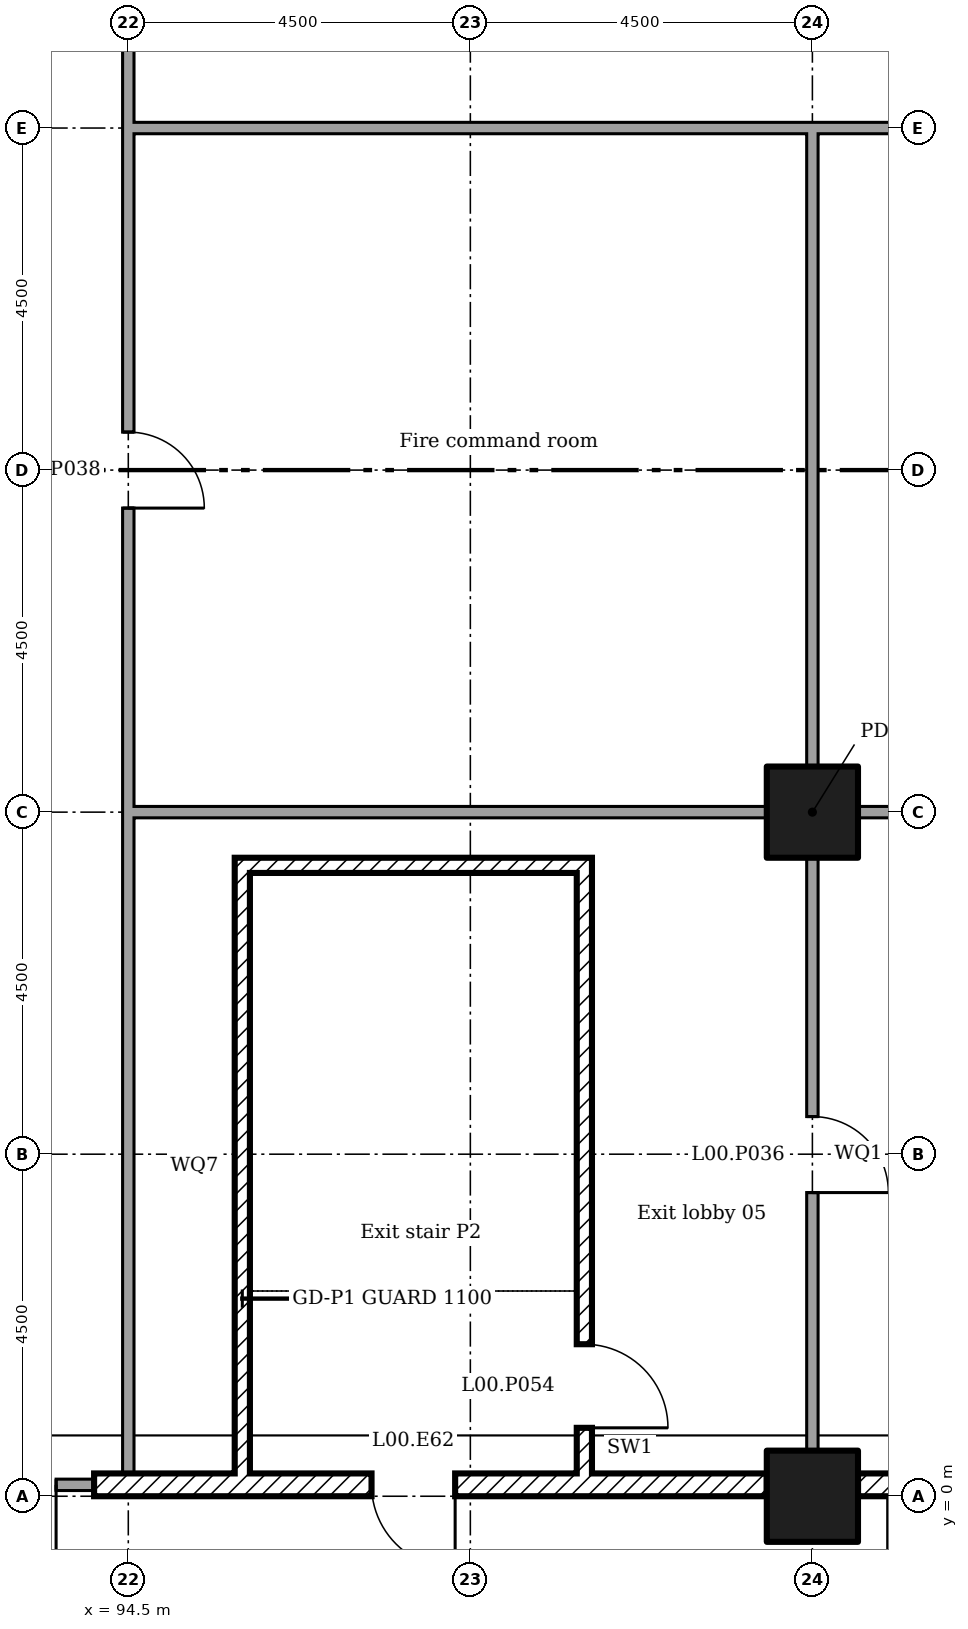
"""IFC4 building model, lengths in metres.
Left out: names, types, materials, properties, quantities, classifications, styles, units other than length and angle.
Written with IfcOpenShell. Run it as: python <this file> out.ifc"""

import sys

from ifc_helpers import new_model, si_unit, direction, frame, frame_2d, origin, origin_2d, place, context, subcontext, project, spatial, rectangle, extrude, element, fill, save


model = new_model("IFC4")
c1 = context("Model", 3, precision=1e-05, world=origin(), true_north=direction((0.0, 1.0)))
c2 = subcontext(c1, "Body", "Model", "MODEL_VIEW")
j1 = project(units=[si_unit("LENGTHUNIT", "METRE"), si_unit("PLANEANGLEUNIT", "RADIAN")], contexts=[c1])
p1 = place(None, origin())
s1 = spatial("IfcSite", under=j1, at=p1, CompositionType="ELEMENT")
p2 = place(p1, origin())
s2 = spatial("IfcBuilding", under=s1, at=p2, CompositionType="ELEMENT")
p3 = place(p2, origin())
s3 = spatial("IfcBuildingStorey", under=s2, at=p3, CompositionType="ELEMENT", Elevation=0.0)
for number, where in (
    (1, (103.5, 0.0, 0.0)),
    (2, (103.5, 9.0, 0.0)),
):
    element("IfcColumn", number, at=place(p3, frame(where)), inside=s3, PredefinedType="COLUMN", context=c2, shape_type="SweptSolid", body=[
        extrude(rectangle(XDim=1.2, YDim=1.2, at=origin_2d()), origin(), (0.0, 0.0, 1.0), 6.0),
    ])
p4 = place(p3, frame((90.6, 0.15, 0.0)))
e3 = element("IfcWall", 3, at=p4, inside=s3, PredefinedType="SOLIDWALL", context=c2, shape_type="SweptSolid", body=[
    extrude(rectangle(XDim=3.45, YDim=0.15, at=frame_2d((1.725, 0.0))), origin(), (0.0, 0.0, 1.0), 5.55),
])
p5 = place(p4, frame((0.55, 0.0, 0.0)))
e4 = element("IfcOpeningElement", 4, at=p5, cuts=e3, PredefinedType="OPENING", context=c2, shape_type="SweptSolid", body=[
    extrude(rectangle(XDim=2.4, YDim=2.7, at=frame_2d((1.2, 1.35))), frame((0.0, 0.085, 0.0), z_axis=(0.0, -1.0, 0.0), x_axis=(1.0, 0.0, 0.0)), (0.0, 0.0, 1.0), 0.17),
])
p6 = place(p3, frame((94.05, 0.15, 0.0)))
e5 = element("IfcWall", 5, at=p6, inside=s3, PredefinedType="ELEMENTEDWALL", context=c2, shape_type="SweptSolid", body=[
    extrude(rectangle(XDim=3.15, YDim=0.3, at=frame_2d((1.575, 0.0))), origin(), (0.0, 0.0, 1.0), 5.55),
])
p7 = place(p3, frame((97.2, 0.15, 0.0)))
e6 = element("IfcWall", 6, at=p7, inside=s3, PredefinedType="ELEMENTEDWALL", context=c2, shape_type="SweptSolid", body=[
    extrude(rectangle(XDim=2.1, YDim=0.3, at=frame_2d((1.05, 0.0))), origin(), (0.0, 0.0, 1.0), 5.55),
])
p8 = place(p7, frame((0.5, 0.0, 0.0)))
e7 = element("IfcOpeningElement", 7, at=p8, cuts=e6, PredefinedType="OPENING", context=c2, shape_type="SweptSolid", body=[
    extrude(rectangle(XDim=1.1, YDim=2.4, at=frame_2d((0.55, 1.2))), frame((0.0, 0.16, 0.0), z_axis=(0.0, -1.0, 0.0), x_axis=(1.0, 0.0, 0.0)), (0.0, 0.0, 1.0), 0.32),
])
p9 = place(p3, frame((99.3, 0.15, 0.0)))
e8 = element("IfcWall", 8, at=p9, inside=s3, PredefinedType="ELEMENTEDWALL", context=c2, shape_type="SweptSolid", body=[
    extrude(rectangle(XDim=3.6, YDim=0.3, at=frame_2d((1.8, 0.0))), origin(), (0.0, 0.0, 1.0), 5.55),
])
p10 = place(p3, frame((104.1, 0.15, 0.0)))
e9 = element("IfcWall", 9, at=p10, inside=s3, PredefinedType="ELEMENTEDWALL", context=c2, shape_type="SweptSolid", body=[
    extrude(rectangle(XDim=4.116, YDim=0.3, at=frame_2d((2.058, 0.0))), origin(), (0.0, 0.0, 1.0), 5.55),
])
p11 = place(p3, frame((94.5, 0.3, 0.0), z_axis=(0.0, 0.0, 1.0), x_axis=(0.0, 1.0, 0.0)))
e10 = element("IfcWall", 10, at=p11, inside=s3, PredefinedType="PARTITIONING", context=c2, shape_type="SweptSolid", body=[
    extrude(rectangle(XDim=8.775, YDim=0.15, at=frame_2d((4.387, 0.0))), origin(), (0.0, 0.0, 1.0), 5.55),
])
p12 = place(p3, frame((94.5, 9.0, 0.0), z_axis=(0.0, 0.0, 1.0), x_axis=(0.0, 1.0, 0.0)))
e11 = element("IfcWall", 11, at=p12, inside=s3, PredefinedType="PARTITIONING", context=c2, shape_type="SweptSolid", body=[
    extrude(rectangle(XDim=9.075, YDim=0.15, at=frame_2d((4.538, 0.0))), origin(), (0.0, 0.0, 1.0), 5.55),
])
p13 = place(p12, frame((4.0, 0.0, 0.0)))
e12 = element("IfcOpeningElement", 12, at=p13, cuts=e11, PredefinedType="OPENING", context=c2, shape_type="SweptSolid", body=[
    extrude(rectangle(XDim=1.0, YDim=2.1, at=frame_2d((0.5, 1.05))), frame((0.0, 0.085, 0.0), z_axis=(0.0, -1.0, 0.0), x_axis=(1.0, 0.0, 0.0)), (0.0, 0.0, 1.0), 0.17),
])
p14 = place(p3, frame((94.5, 18.0, 0.0), z_axis=(0.0, 0.0, 1.0), x_axis=(0.0, 1.0, 0.0)))
e13 = element("IfcWall", 13, at=p14, inside=s3, PredefinedType="PARTITIONING", context=c2, shape_type="SweptSolid", body=[
    extrude(rectangle(XDim=4.425, YDim=0.15, at=frame_2d((2.212, 0.0))), origin(), (0.0, 0.0, 1.0), 5.55),
])
p15 = place(p3, frame((103.5, 0.595, 0.0), z_axis=(0.0, 0.0, 1.0), x_axis=(0.0, 1.0, 0.0)))
e14 = element("IfcWall", 14, at=p15, inside=s3, PredefinedType="PARTITIONING", context=c2, shape_type="SweptSolid", body=[
    extrude(rectangle(XDim=7.81, YDim=0.15, at=frame_2d((3.905, 0.0))), origin(), (0.0, 0.0, 1.0), 5.55),
])
p16 = place(p15, frame((3.4, 0.0, 0.0)))
e15 = element("IfcOpeningElement", 15, at=p16, cuts=e14, PredefinedType="OPENING", context=c2, shape_type="SweptSolid", body=[
    extrude(rectangle(XDim=1.0, YDim=2.1, at=frame_2d((0.5, 1.05))), frame((0.0, 0.085, 0.0), z_axis=(0.0, -1.0, 0.0), x_axis=(1.0, 0.0, 0.0)), (0.0, 0.0, 1.0), 0.17),
])
p17 = place(p3, frame((94.575, 9.0, 0.0)))
e16 = element("IfcWall", 16, at=p17, inside=s3, PredefinedType="PARTITIONING", context=c2, shape_type="SweptSolid", body=[
    extrude(rectangle(XDim=8.33, YDim=0.15, at=frame_2d((4.165, 0.0))), origin(), (0.0, 0.0, 1.0), 5.55),
])
p18 = place(p3, frame((96.0, 0.3, 0.0), z_axis=(0.0, 0.0, 1.0), x_axis=(0.0, 1.0, 0.0)))
e17 = element("IfcWall", 17, at=p18, inside=s3, PredefinedType="SOLIDWALL", context=c2, shape_type="SweptSolid", body=[
    extrude(rectangle(XDim=8.1, YDim=0.2, at=frame_2d((4.05, 0.0))), origin(), (0.0, 0.0, 1.0), 5.55),
])
p19 = place(p3, frame((100.5, 0.3, 0.0), z_axis=(0.0, 0.0, 1.0), x_axis=(0.0, 1.0, 0.0)))
e18 = element("IfcWall", 18, at=p19, inside=s3, PredefinedType="SOLIDWALL", context=c2, shape_type="SweptSolid", body=[
    extrude(rectangle(XDim=8.1, YDim=0.2, at=frame_2d((4.05, 0.0))), origin(), (0.0, 0.0, 1.0), 5.55),
])
p20 = place(p19, frame((0.6, 0.0, 0.0)))
e19 = element("IfcOpeningElement", 19, at=p20, cuts=e18, PredefinedType="OPENING", context=c2, shape_type="SweptSolid", body=[
    extrude(rectangle(XDim=1.1, YDim=2.1, at=frame_2d((0.55, 1.05))), frame((0.0, 0.11, 0.0), z_axis=(0.0, -1.0, 0.0), x_axis=(1.0, 0.0, 0.0)), (0.0, 0.0, 1.0), 0.22),
])
p21 = place(p3, frame((96.1, 8.3, 0.0)))
e20 = element("IfcWall", 20, at=p21, inside=s3, PredefinedType="SOLIDWALL", context=c2, shape_type="SweptSolid", body=[
    extrude(rectangle(XDim=4.3, YDim=0.2, at=frame_2d((2.15, 0.0))), origin(), (0.0, 0.0, 1.0), 5.55),
])
p22 = place(p3, frame((104.095, 9.0, 0.0)))
e21 = element("IfcWall", 21, at=p22, inside=s3, PredefinedType="PARTITIONING", context=c2, shape_type="SweptSolid", body=[
    extrude(rectangle(XDim=3.83, YDim=0.15, at=frame_2d((1.915, 0.0))), origin(), (0.0, 0.0, 1.0), 5.55),
])
p23 = place(p3, frame((103.5, 9.595, 0.0), z_axis=(0.0, 0.0, 1.0), x_axis=(0.0, 1.0, 0.0)))
e22 = element("IfcWall", 22, at=p23, inside=s3, PredefinedType="PARTITIONING", context=c2, shape_type="SweptSolid", body=[
    extrude(rectangle(XDim=8.48, YDim=0.15, at=frame_2d((4.24, 0.0))), origin(), (0.0, 0.0, 1.0), 5.55),
])
p24 = place(p3, frame((94.575, 18.0, 0.0)))
e23 = element("IfcWall", 23, at=p24, inside=s3, PredefinedType="PARTITIONING", context=c2, shape_type="SweptSolid", body=[
    extrude(rectangle(XDim=8.85, YDim=0.15, at=frame_2d((4.425, 0.0))), origin(), (0.0, 0.0, 1.0), 5.55),
])
p25 = place(p3, frame((103.5, 18.0, 0.0)))
e24 = element("IfcWall", 24, at=p25, inside=s3, PredefinedType="PARTITIONING", context=c2, shape_type="SweptSolid", body=[
    extrude(rectangle(XDim=9.075, YDim=0.15, at=frame_2d((4.538, 0.0))), origin(), (0.0, 0.0, 1.0), 5.55),
])
p26 = place(p25, frame((4.0, 0.0, 0.0)))
e25 = element("IfcOpeningElement", 25, at=p26, cuts=e24, PredefinedType="OPENING", context=c2, shape_type="SweptSolid", body=[
    extrude(rectangle(XDim=1.0, YDim=2.1, at=frame_2d((0.5, 1.05))), frame((0.0, 0.085, 0.0), z_axis=(0.0, -1.0, 0.0), x_axis=(1.0, 0.0, 0.0)), (0.0, 0.0, 1.0), 0.17),
])
p27 = place(p5, frame((2.4, 0.0, 0.0), x_axis=(-1.0, 0.0, 0.0)))
e26 = element("IfcDoor", 26, at=p27, inside=s3, OperationType="DOUBLE_DOOR_DOUBLE_SWING", PredefinedType="NOTDEFINED", context=c2, shape_type="SweptSolid", body=[
    extrude(rectangle(XDim=2.4, YDim=2.7, at=frame_2d((1.2, 1.35))), frame((0.0, 0.025, 0.0), z_axis=(0.0, -1.0, 0.0), x_axis=(1.0, 0.0, 0.0)), (0.0, 0.0, 1.0), 0.05),
])
fill(e4, e26)
p28 = place(p8, frame((1.1, 0.0, 0.0), x_axis=(-1.0, 0.0, 0.0)))
e27 = element("IfcDoor", 27, at=p28, inside=s3, OperationType="SINGLE_SWING_RIGHT", PredefinedType="NOTDEFINED", context=c2, shape_type="SweptSolid", body=[
    extrude(rectangle(XDim=1.1, YDim=2.4, at=frame_2d((0.55, 1.2))), frame((0.0, 0.025, 0.0), z_axis=(0.0, -1.0, 0.0), x_axis=(1.0, 0.0, 0.0)), (0.0, 0.0, 1.0), 0.05),
])
fill(e7, e27)
p29 = place(p16, frame((1.0, 0.0, 0.0), x_axis=(-1.0, 0.0, 0.0)))
e28 = element("IfcDoor", 28, at=p29, inside=s3, OperationType="SINGLE_SWING_LEFT", PredefinedType="DOOR", context=c2, shape_type="SweptSolid", body=[
    extrude(rectangle(XDim=1.0, YDim=2.1, at=frame_2d((0.5, 1.05))), frame((0.0, 0.025, 0.0), z_axis=(0.0, -1.0, 0.0), x_axis=(1.0, 0.0, 0.0)), (0.0, 0.0, 1.0), 0.05),
])
fill(e15, e28)
p30 = place(p13, frame((1.0, 0.0, 0.0), x_axis=(-1.0, 0.0, 0.0)))
e29 = element("IfcDoor", 29, at=p30, inside=s3, OperationType="SINGLE_SWING_LEFT", PredefinedType="DOOR", context=c2, shape_type="SweptSolid", body=[
    extrude(rectangle(XDim=1.0, YDim=2.1, at=frame_2d((0.5, 1.05))), frame((0.0, 0.025, 0.0), z_axis=(0.0, -1.0, 0.0), x_axis=(1.0, 0.0, 0.0)), (0.0, 0.0, 1.0), 0.05),
])
fill(e12, e29)
p31 = place(p20, frame((1.1, 0.0, 0.0), x_axis=(-1.0, 0.0, 0.0)))
e30 = element("IfcDoor", 30, at=p31, inside=s3, OperationType="SINGLE_SWING_LEFT", PredefinedType="DOOR", context=c2, shape_type="SweptSolid", body=[
    extrude(rectangle(XDim=1.1, YDim=2.1, at=frame_2d((0.55, 1.05))), frame((0.0, 0.025, 0.0), z_axis=(0.0, -1.0, 0.0), x_axis=(1.0, 0.0, 0.0)), (0.0, 0.0, 1.0), 0.05),
])
fill(e19, e30)
save(model, sys.argv[1])
